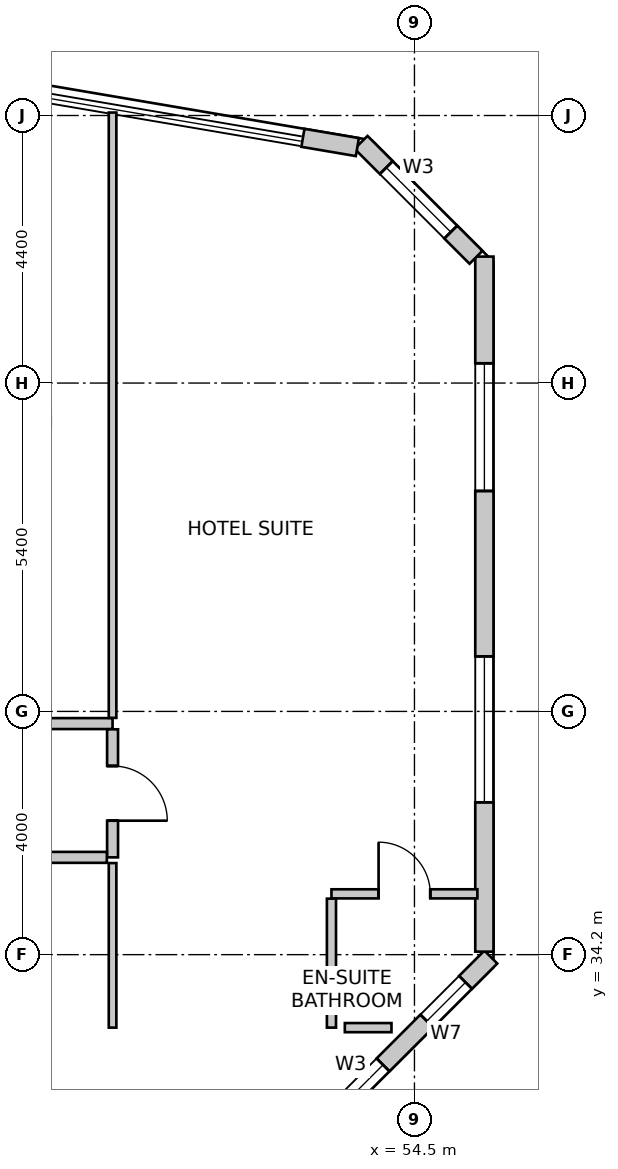
"""IFC4 building model, lengths in metres.
Left out: names, types, materials, properties, quantities, classifications, styles, units other than length and angle.
Written with IfcOpenShell. Run it as: python <this file> out.ifc"""

import sys

from ifc_helpers import new_model, si_unit, direction, frame, frame_2d, origin, place, context, subcontext, project, spatial, rectangle, extrude, source, transform, mapped, element, fill, save


model = new_model("IFC4")
c1 = context("Model", 3, precision=1e-05, world=origin(), true_north=direction((0.0, 1.0)))
c2 = subcontext(c1, "Body", "Model", "MODEL_VIEW")
j1 = project(units=[si_unit("LENGTHUNIT", "METRE"), si_unit("PLANEANGLEUNIT", "RADIAN")], contexts=[c1])
p1 = place(None, origin())
s1 = spatial("IfcSite", under=j1, at=p1, CompositionType="ELEMENT")
p2 = place(p1, origin())
s2 = spatial("IfcBuilding", under=s1, at=p2, CompositionType="ELEMENT")
p3 = place(p2, frame((0.0, 0.0, 110.6)))
s3 = spatial("IfcBuildingStorey", under=s2, at=p3, CompositionType="ELEMENT", Elevation=110.6)
p4 = place(p3, frame((52.476, 30.88, 0.0), z_axis=(0.0, 0.0, 1.0), x_axis=(0.707106781187, 0.707106781187, 0.0)))
e1 = element("IfcWall", 1, at=p4, inside=s3, PredefinedType="SOLIDWALL", context=c2, shape_type="SweptSolid", body=[
    extrude(rectangle(XDim=4.639, YDim=0.3, at=frame_2d((2.319, 0.0))), origin(), (0.0, 0.0, 1.0), 3.35),
])
m1 = source(origin(), c2, "Body", "SweptSolid", [
    extrude(rectangle(XDim=1.5, YDim=1.8, at=frame_2d((0.75, 0.9))), frame((0.0, 0.16, 0.0), z_axis=(0.0, -1.0, 0.0), x_axis=(1.0, 0.0, 0.0)), (0.0, 0.0, 1.0), 0.32),
])
p5 = place(p4, frame((0.632, 0.0, 0.85)))
e2 = element("IfcOpeningElement", 2, at=p5, cuts=e1, PredefinedType="OPENING", context=c2, shape_type="MappedRepresentation", body=[
    mapped(m1, transform((0.0, 0.0, 0.0), scale=1.0)),
])
m2 = source(origin(), c2, "Body", "SweptSolid", [
    extrude(rectangle(XDim=0.9, YDim=1.6, at=frame_2d((0.45, 0.8))), frame((0.0, 0.16, 0.0), z_axis=(0.0, -1.0, 0.0), x_axis=(1.0, 0.0, 0.0)), (0.0, 0.0, 1.0), 0.32),
])
p6 = place(p4, frame((3.151, 0.0, 0.85)))
e3 = element("IfcOpeningElement", 3, at=p6, cuts=e1, PredefinedType="OPENING", context=c2, shape_type="MappedRepresentation", body=[
    mapped(m2, transform((0.0, 0.0, 0.0), scale=1.0)),
])
p7 = place(p3, frame((55.65, 34.249, 0.0), z_axis=(0.0, 0.0, 1.0), x_axis=(0.0, 1.0, 0.0)))
e4 = element("IfcWall", 4, at=p7, inside=s3, PredefinedType="SOLIDWALL", context=c2, shape_type="SweptSolid", body=[
    extrude(rectangle(XDim=11.431, YDim=0.3, at=frame_2d((5.715, 0.0))), origin(), (0.0, 0.0, 1.0), 3.35),
])
m3 = source(origin(), c2, "Body", "SweptSolid", [
    extrude(rectangle(XDim=2.4, YDim=2.2, at=frame_2d((1.2, 1.1))), frame((0.0, 0.16, 0.0), z_axis=(0.0, -1.0, 0.0), x_axis=(1.0, 0.0, 0.0)), (0.0, 0.0, 1.0), 0.32),
])
p8 = place(p7, frame((2.456, 0.0, 0.85)))
e5 = element("IfcOpeningElement", 5, at=p8, cuts=e4, PredefinedType="OPENING", context=c2, shape_type="MappedRepresentation", body=[
    mapped(m3, transform((0.0, 0.0, 0.0), scale=1.0)),
])
m4 = source(origin(), c2, "Body", "SweptSolid", [
    extrude(rectangle(XDim=2.1, YDim=2.0, at=frame_2d((1.05, 1.0))), frame((0.0, 0.16, 0.0), z_axis=(0.0, -1.0, 0.0), x_axis=(1.0, 0.0, 0.0)), (0.0, 0.0, 1.0), 0.32),
])
p9 = place(p7, frame((7.576, 0.0, 0.85)))
e6 = element("IfcOpeningElement", 6, at=p9, cuts=e4, PredefinedType="OPENING", context=c2, shape_type="MappedRepresentation", body=[
    mapped(m4, transform((0.0, 0.0, 0.0), scale=1.0)),
])
p10 = place(p3, frame((55.512, 45.668, 0.0), z_axis=(0.0, 0.0, 1.0), x_axis=(-0.707152443695, 0.707061115729, 0.0)))
e7 = element("IfcWall", 7, at=p10, inside=s3, PredefinedType="SOLIDWALL", context=c2, shape_type="SweptSolid", body=[
    extrude(rectangle(XDim=2.673, YDim=0.3, at=frame_2d((1.337, 0.0))), origin(), (0.0, 0.0, 1.0), 3.35),
])
p11 = place(p10, frame((0.587, 0.0, 0.85)))
e8 = element("IfcOpeningElement", 8, at=p11, cuts=e7, PredefinedType="OPENING", context=c2, shape_type="MappedRepresentation", body=[
    mapped(m1, transform((0.0, 0.0, 0.0), scale=1.0)),
])
p12 = place(p3, frame((53.561, 47.48, 0.0), z_axis=(0.0, 0.0, 1.0), x_axis=(-0.985836300899, 0.167710428506, 0.0)))
e9 = element("IfcWall", 9, at=p12, inside=s3, PredefinedType="SOLIDWALL", context=c2, shape_type="SweptSolid", body=[
    extrude(rectangle(XDim=0.908, YDim=0.3, at=frame_2d((0.454, 0.0))), origin(), (0.0, 0.0, 1.0), 3.35),
])
p13 = place(p3, frame((44.452, 38.0, 0.0), z_axis=(0.0, 0.0, 1.0), x_axis=(1.0, 0.0, 0.0)))
e10 = element("IfcWall", 10, at=p13, inside=s3, PredefinedType="PARTITIONING", context=c2, shape_type="SweptSolid", body=[
    extrude(rectangle(XDim=5.083, YDim=0.18, at=frame_2d((2.542, 0.0))), origin(), (0.0, 0.0, 1.0), 2.803),
])
m5 = source(origin(), c2, "Body", "SweptSolid", [
    extrude(rectangle(XDim=0.9, YDim=2.15, at=frame_2d((0.45, 1.075))), frame((0.0, 0.1, 0.0), z_axis=(0.0, -1.0, 0.0), x_axis=(1.0, 0.0, 0.0)), (0.0, 0.0, 1.0), 0.2),
])
p14 = place(p13, frame((2.092, 0.0, 0.0)))
e11 = element("IfcOpeningElement", 11, at=p14, cuts=e10, PredefinedType="OPENING", context=c2, shape_type="MappedRepresentation", body=[
    mapped(m5, transform((0.0, 0.0, 0.0), scale=1.0)),
])
p15 = place(p3, frame((49.535, 37.906, 0.0), z_axis=(0.0, 0.0, 1.0), x_axis=(0.0, -1.0, 0.0)))
e12 = element("IfcWall", 12, at=p15, inside=s3, PredefinedType="PARTITIONING", context=c2, shape_type="SweptSolid", body=[
    extrude(rectangle(XDim=2.106, YDim=0.18, at=frame_2d((1.053, 0.0))), origin(), (0.0, 0.0, 1.0), 3.35),
])
p16 = place(p15, frame((0.603, 0.0, 0.0)))
e13 = element("IfcOpeningElement", 13, at=p16, cuts=e12, PredefinedType="OPENING", context=c2, shape_type="MappedRepresentation", body=[
    mapped(m5, transform((0.0, 0.0, 0.0), scale=1.0)),
])
p17 = place(p3, frame((49.441, 35.8, 0.0), z_axis=(0.0, 0.0, 1.0), x_axis=(-1.0, 0.0, 0.0)))
e14 = element("IfcWall", 14, at=p17, inside=s3, PredefinedType="PARTITIONING", context=c2, shape_type="SweptSolid", body=[
    extrude(rectangle(XDim=15.641, YDim=0.18, at=frame_2d((7.82, 0.0))), origin(), (0.0, 0.0, 1.0), 2.803),
])
p18 = place(p17, frame((7.371, 0.0, 0.0)))
e15 = element("IfcOpeningElement", 15, at=p18, cuts=e14, PredefinedType="OPENING", context=c2, shape_type="MappedRepresentation", body=[
    mapped(m5, transform((0.0, 0.0, 0.0), scale=1.0)),
])
p19 = place(p3, frame((49.535, 48.049, 0.0), z_axis=(0.0, 0.0, 1.0), x_axis=(0.0, -1.0, 0.0)))
e16 = element("IfcWall", 16, at=p19, inside=s3, PredefinedType="PARTITIONING", context=c2, shape_type="SweptSolid", body=[
    extrude(rectangle(XDim=9.955, YDim=0.125, at=frame_2d((4.977, 0.0))), origin(), (0.0, 0.0, 1.0), 3.35),
])
p20 = place(p3, frame((53.135, 35.2, 0.0), z_axis=(0.0, 0.0, 1.0), x_axis=(1.0, 0.0, 0.0)))
e17 = element("IfcWall", 17, at=p20, inside=s3, PredefinedType="PARTITIONING", context=c2, shape_type="SweptSolid", body=[
    extrude(rectangle(XDim=2.4, YDim=0.15, at=frame_2d((1.2, 0.0))), origin(), (0.0, 0.0, 1.0), 3.35),
])
m6 = source(origin(), c2, "Body", "SweptSolid", [
    extrude(rectangle(XDim=0.85, YDim=2.15, at=frame_2d((0.425, 1.075))), frame((0.0, 0.085, 0.0), z_axis=(0.0, -1.0, 0.0), x_axis=(1.0, 0.0, 0.0)), (0.0, 0.0, 1.0), 0.17),
])
p21 = place(p20, frame((0.775, 0.0, 0.0)))
e18 = element("IfcOpeningElement", 18, at=p21, cuts=e17, PredefinedType="OPENING", context=c2, shape_type="MappedRepresentation", body=[
    mapped(m6, transform((0.0, 0.0, 0.0), scale=1.0)),
])
p22 = place(p3, frame((53.135, 33.0, 0.0), z_axis=(0.0, 0.0, 1.0), x_axis=(0.0, 1.0, 0.0)))
e19 = element("IfcWall", 19, at=p22, inside=s3, PredefinedType="PARTITIONING", context=c2, shape_type="SweptSolid", body=[
    extrude(rectangle(XDim=2.121, YDim=0.15, at=frame_2d((1.061, 0.0))), origin(), (0.0, 0.0, 1.0), 3.35),
])
p23 = place(p3, frame((49.535, 33.0, 0.0), z_axis=(0.0, 0.0, 1.0), x_axis=(0.0, 1.0, 0.0)))
e20 = element("IfcWall", 20, at=p23, inside=s3, PredefinedType="PARTITIONING", context=c2, shape_type="SweptSolid", body=[
    extrude(rectangle(XDim=2.706, YDim=0.125, at=frame_2d((1.353, 0.0))), origin(), (0.0, 0.0, 1.0), 3.35),
])
p24 = place(p3, frame((54.122, 33.0, 0.0), z_axis=(0.0, 0.0, 1.0), x_axis=(-1.0, 0.0, 0.0)))
e21 = element("IfcWall", 21, at=p24, inside=s3, PredefinedType="PARTITIONING", context=c2, shape_type="SweptSolid", body=[
    extrude(rectangle(XDim=0.767, YDim=0.15, at=frame_2d((0.384, 0.0))), origin(), (0.0, 0.0, 1.0), 3.35),
])
m7 = source(origin(), c2, "Body", "SweptSolid", [
    extrude(rectangle(XDim=1.5, YDim=1.8, at=frame_2d((0.75, 0.9))), frame((0.0, -0.015, 0.0), z_axis=(0.0, -1.0, 0.0), x_axis=(1.0, 0.0, 0.0)), (0.0, 0.0, 1.0), 0.06),
])
p25 = place(p5, origin())
e22 = element("IfcWindow", 22, at=p25, inside=s3, PartitioningType="SINGLE_PANEL", PredefinedType="WINDOW", context=c2, shape_type="MappedRepresentation", body=[
    mapped(m7, transform((0.0, 0.0, 0.0), scale=1.0)),
])
fill(e2, e22)
m8 = source(origin(), c2, "Body", "SweptSolid", [
    extrude(rectangle(XDim=0.9, YDim=1.6, at=frame_2d((0.45, 0.8))), frame((0.0, -0.015, 0.0), z_axis=(0.0, -1.0, 0.0), x_axis=(1.0, 0.0, 0.0)), (0.0, 0.0, 1.0), 0.06),
])
p26 = place(p6, origin())
e23 = element("IfcWindow", 23, at=p26, inside=s3, PartitioningType="SINGLE_PANEL", PredefinedType="WINDOW", context=c2, shape_type="MappedRepresentation", body=[
    mapped(m8, transform((0.0, 0.0, 0.0), scale=1.0)),
])
fill(e3, e23)
m9 = source(origin(), c2, "Body", "SweptSolid", [
    extrude(rectangle(XDim=2.4, YDim=2.2, at=frame_2d((1.2, 1.1))), frame((0.0, -0.015, 0.0), z_axis=(0.0, -1.0, 0.0), x_axis=(1.0, 0.0, 0.0)), (0.0, 0.0, 1.0), 0.06),
])
p27 = place(p8, origin())
e24 = element("IfcWindow", 24, at=p27, inside=s3, PartitioningType="SINGLE_PANEL", PredefinedType="WINDOW", context=c2, shape_type="MappedRepresentation", body=[
    mapped(m9, transform((0.0, 0.0, 0.0), scale=1.0)),
])
fill(e5, e24)
m10 = source(origin(), c2, "Body", "SweptSolid", [
    extrude(rectangle(XDim=2.1, YDim=2.0, at=frame_2d((1.05, 1.0))), frame((0.0, -0.015, 0.0), z_axis=(0.0, -1.0, 0.0), x_axis=(1.0, 0.0, 0.0)), (0.0, 0.0, 1.0), 0.06),
])
p28 = place(p9, origin())
e25 = element("IfcWindow", 25, at=p28, inside=s3, PartitioningType="SINGLE_PANEL", PredefinedType="WINDOW", context=c2, shape_type="MappedRepresentation", body=[
    mapped(m10, transform((0.0, 0.0, 0.0), scale=1.0)),
])
fill(e6, e25)
p29 = place(p11, origin())
e26 = element("IfcWindow", 26, at=p29, inside=s3, PartitioningType="SINGLE_PANEL", PredefinedType="WINDOW", context=c2, shape_type="MappedRepresentation", body=[
    mapped(m7, transform((0.0, 0.0, 0.0), scale=1.0)),
])
fill(e8, e26)
m11 = source(origin(), c2, "Body", "SweptSolid", [
    extrude(rectangle(XDim=0.85, YDim=2.15, at=frame_2d((0.425, 1.075))), frame((0.0, 0.025, 0.0), z_axis=(0.0, -1.0, 0.0), x_axis=(1.0, 0.0, 0.0)), (0.0, 0.0, 1.0), 0.05),
])
p30 = place(p21, origin())
e27 = element("IfcDoor", 27, at=p30, inside=s3, OperationType="SINGLE_SWING_LEFT", PredefinedType="DOOR", context=c2, shape_type="MappedRepresentation", body=[
    mapped(m11, transform((0.0, 0.0, 0.0), scale=1.0)),
])
fill(e18, e27)
m12 = source(origin(), c2, "Body", "SweptSolid", [
    extrude(rectangle(XDim=0.9, YDim=2.15, at=frame_2d((0.45, 1.075))), frame((0.0, 0.025, 0.0), z_axis=(0.0, -1.0, 0.0), x_axis=(1.0, 0.0, 0.0)), (0.0, 0.0, 1.0), 0.05),
])
p31 = place(p16, origin())
e28 = element("IfcDoor", 28, at=p31, inside=s3, OperationType="SINGLE_SWING_RIGHT", PredefinedType="DOOR", context=c2, shape_type="MappedRepresentation", body=[
    mapped(m12, transform((0.0, 0.0, 0.0), scale=1.0)),
])
fill(e13, e28)
save(model, sys.argv[1])
